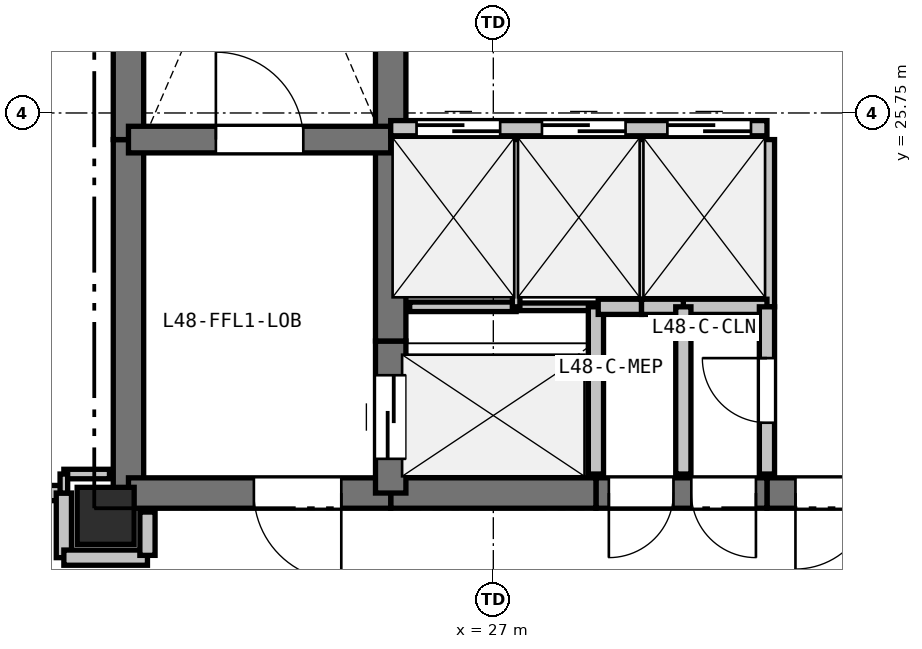
"""IFC4 building model, lengths in metres.
Left out: names, types, materials, properties, quantities, classifications, styles, units other than length and angle.
Written with IfcOpenShell. Run it as: python <this file> out.ifc"""

import sys

from ifc_helpers import new_model, si_unit, direction, frame, frame_2d, origin, origin_2d, place, context, subcontext, project, spatial, rectangle, extrude, element, fill, save


model = new_model("IFC4")
c1 = context("Model", 3, precision=1e-05, world=origin(), true_north=direction((0.0, 1.0)))
c2 = subcontext(c1, "Body", "Model", "MODEL_VIEW")
j1 = project(units=[si_unit("LENGTHUNIT", "METRE"), si_unit("PLANEANGLEUNIT", "RADIAN")], contexts=[c1])
p1 = place(None, origin())
s1 = spatial("IfcSite", under=j1, at=p1, CompositionType="ELEMENT")
p2 = place(p1, origin())
s2 = spatial("IfcBuilding", under=s1, at=p2, CompositionType="ELEMENT")
p3 = place(p2, frame((0.0, 0.0, 175.5)))
s3 = spatial("IfcBuildingStorey", under=s2, at=p3, CompositionType="ELEMENT", Elevation=175.5)
p4 = place(p3, frame((21.9, 20.45, 0.0), z_axis=(0.0, 0.0, 1.0), x_axis=(1.0, 0.0, 0.0)))
e1 = element("IfcColumn", 1, at=p4, inside=s3, PredefinedType="COLUMN", context=c2, shape_type="SweptSolid", body=[
    extrude(rectangle(XDim=0.75, YDim=0.75, at=origin_2d()), origin(), (0.0, 0.0, 1.0), 3.3),
])
p5 = place(p3, frame((22.2, 20.75, 0.0), z_axis=(0.0, 0.0, 1.0), x_axis=(0.0, 1.0, 0.0)))
e2 = element("IfcWall", 2, at=p5, inside=s3, PredefinedType="SHEAR", context=c2, shape_type="SweptSolid", body=[
    extrude(rectangle(XDim=4.65, YDim=0.4, at=frame_2d((2.325, 0.0))), origin(), (0.0, 0.0, 1.0), 3.07),
])
p6 = place(p3, frame((22.2, 25.4, 0.0), z_axis=(0.0, 0.0, 1.0), x_axis=(0.0, 1.0, 0.0)))
e3 = element("IfcWall", 3, at=p6, inside=s3, PredefinedType="SHEAR", context=c2, shape_type="SweptSolid", body=[
    extrude(rectangle(XDim=7.35, YDim=0.4, at=frame_2d((3.675, 0.0))), origin(), (0.0, 0.0, 1.0), 3.07),
])
p7 = place(p3, frame((32.35, 20.75, 0.0), z_axis=(0.0, 0.0, 1.0), x_axis=(-1.0, 0.0, 0.0)))
e4 = element("IfcWall", 4, at=p7, inside=s3, PredefinedType="SHEAR", context=c2, shape_type="SweptSolid", body=[
    extrude(rectangle(XDim=1.75, YDim=0.4, at=frame_2d((0.875, 0.0))), origin(), (0.0, 0.0, 1.0), 3.07),
])
p8 = place(p7, frame((0.375, 0.0, 0.0)))
e5 = element("IfcOpeningElement", 5, at=p8, cuts=e4, PredefinedType="OPENING", context=c2, shape_type="SweptSolid", body=[
    extrude(rectangle(XDim=1.0, YDim=2.15, at=frame_2d((0.5, 1.075))), frame((0.0, 0.21, 0.0), z_axis=(0.0, -1.0, 0.0), x_axis=(1.0, 0.0, 0.0)), (0.0, 0.0, 1.0), 0.42),
])
p9 = place(p3, frame((30.6, 20.75, 0.0), z_axis=(0.0, 0.0, 1.0), x_axis=(-1.0, 0.0, 0.0)))
e6 = element("IfcWall", 6, at=p9, inside=s3, PredefinedType="SHEAR", context=c2, shape_type="SweptSolid", body=[
    extrude(rectangle(XDim=2.25, YDim=0.4, at=frame_2d((1.125, 0.0))), origin(), (0.0, 0.0, 1.0), 3.07),
])
p10 = place(p9, frame((1.23, 0.0, 0.0)))
e7 = element("IfcOpeningElement", 7, at=p10, cuts=e6, PredefinedType="OPENING", context=c2, shape_type="SweptSolid", body=[
    extrude(rectangle(XDim=0.85, YDim=2.1, at=frame_2d((0.425, 1.05))), frame((0.0, 0.21, 0.0), z_axis=(0.0, -1.0, 0.0), x_axis=(1.0, 0.0, 0.0)), (0.0, 0.0, 1.0), 0.42),
])
p11 = place(p9, frame((0.145, 0.0, 0.0)))
e8 = element("IfcOpeningElement", 8, at=p11, cuts=e6, PredefinedType="OPENING", context=c2, shape_type="SweptSolid", body=[
    extrude(rectangle(XDim=0.85, YDim=2.1, at=frame_2d((0.425, 1.05))), frame((0.0, 0.21, 0.0), z_axis=(0.0, -1.0, 0.0), x_axis=(1.0, 0.0, 0.0)), (0.0, 0.0, 1.0), 0.42),
])
p12 = place(p3, frame((28.35, 20.75, 0.0), z_axis=(0.0, 0.0, 1.0), x_axis=(-1.0, 0.0, 0.0)))
e9 = element("IfcWall", 9, at=p12, inside=s3, PredefinedType="SHEAR", context=c2, shape_type="SweptSolid", body=[
    extrude(rectangle(XDim=2.7, YDim=0.4, at=frame_2d((1.35, 0.0))), origin(), (0.0, 0.0, 1.0), 3.07),
])
p13 = place(p3, frame((25.65, 20.75, 0.0), z_axis=(0.0, 0.0, 1.0), x_axis=(-1.0, 0.0, 0.0)))
e10 = element("IfcWall", 10, at=p13, inside=s3, PredefinedType="SHEAR", context=c2, shape_type="SweptSolid", body=[
    extrude(rectangle(XDim=3.45, YDim=0.4, at=frame_2d((1.725, 0.0))), origin(), (0.0, 0.0, 1.0), 3.07),
])
p14 = place(p13, frame((0.65, 0.0, 0.0)))
e11 = element("IfcOpeningElement", 11, at=p14, cuts=e10, PredefinedType="OPENING", context=c2, shape_type="SweptSolid", body=[
    extrude(rectangle(XDim=1.15, YDim=2.15, at=frame_2d((0.575, 1.075))), frame((0.0, 0.21, 0.0), z_axis=(0.0, -1.0, 0.0), x_axis=(1.0, 0.0, 0.0)), (0.0, 0.0, 1.0), 0.42),
])
p15 = place(p3, frame((25.65, 20.75, 0.0), z_axis=(0.0, 0.0, 1.0), x_axis=(0.0, 1.0, 0.0)))
e12 = element("IfcWall", 12, at=p15, inside=s3, PredefinedType="SHEAR", context=c2, shape_type="SweptSolid", body=[
    extrude(rectangle(XDim=2.0, YDim=0.4, at=frame_2d((1.0, 0.0))), origin(), (0.0, 0.0, 1.0), 3.07),
])
p16 = place(p15, frame((0.45, 0.0, 0.0)))
e13 = element("IfcOpeningElement", 13, at=p16, cuts=e12, PredefinedType="OPENING", context=c2, shape_type="SweptSolid", body=[
    extrude(rectangle(XDim=1.1, YDim=2.15, at=frame_2d((0.55, 1.075))), frame((0.0, 0.21, 0.0), z_axis=(0.0, -1.0, 0.0), x_axis=(1.0, 0.0, 0.0)), (0.0, 0.0, 1.0), 0.42),
])
p17 = place(p3, frame((25.65, 22.75, 0.0), z_axis=(0.0, 0.0, 1.0), x_axis=(0.0, 1.0, 0.0)))
e14 = element("IfcWall", 14, at=p17, inside=s3, PredefinedType="SHEAR", context=c2, shape_type="SweptSolid", body=[
    extrude(rectangle(XDim=2.8, YDim=0.4, at=frame_2d((1.4, 0.0))), origin(), (0.0, 0.0, 1.0), 3.07),
])
p18 = place(p3, frame((25.65, 25.55, 0.0), z_axis=(0.0, 0.0, 1.0), x_axis=(0.0, 1.0, 0.0)))
e15 = element("IfcWall", 15, at=p18, inside=s3, PredefinedType="SHEAR", context=c2, shape_type="SweptSolid", body=[
    extrude(rectangle(XDim=2.4, YDim=0.4, at=frame_2d((1.2, 0.0))), origin(), (0.0, 0.0, 1.0), 3.07),
])
p19 = place(p3, frame((22.2, 25.4, 0.0), z_axis=(0.0, 0.0, 1.0), x_axis=(1.0, 0.0, 0.0)))
e16 = element("IfcWall", 16, at=p19, inside=s3, PredefinedType="SHEAR", context=c2, shape_type="SweptSolid", body=[
    extrude(rectangle(XDim=3.45, YDim=0.35, at=frame_2d((1.725, 0.0))), origin(), (0.0, 0.0, 1.0), 3.07),
])
p20 = place(p19, frame((1.15, 0.0, 0.0)))
e17 = element("IfcOpeningElement", 17, at=p20, cuts=e16, PredefinedType="OPENING", context=c2, shape_type="SweptSolid", body=[
    extrude(rectangle(XDim=1.15, YDim=2.15, at=frame_2d((0.575, 1.075))), frame((0.0, 0.185, 0.0), z_axis=(0.0, -1.0, 0.0), x_axis=(1.0, 0.0, 0.0)), (0.0, 0.0, 1.0), 0.37),
])
p21 = place(p3, frame((25.65, 25.55, 0.0), z_axis=(0.0, 0.0, 1.0), x_axis=(1.0, 0.0, 0.0)))
e18 = element("IfcWall", 18, at=p21, inside=s3, PredefinedType="PARTITIONING", context=c2, shape_type="SweptSolid", body=[
    extrude(rectangle(XDim=4.95, YDim=0.2, at=frame_2d((2.475, 0.0))), origin(), (0.0, 0.0, 1.0), 3.07),
])
p22 = place(p21, frame((0.34, 0.0, 0.0)))
e19 = element("IfcOpeningElement", 19, at=p22, cuts=e18, PredefinedType="OPENING", context=c2, shape_type="SweptSolid", body=[
    extrude(rectangle(XDim=1.1, YDim=2.15, at=frame_2d((0.55, 1.075))), frame((0.0, 0.11, 0.0), z_axis=(0.0, -1.0, 0.0), x_axis=(1.0, 0.0, 0.0)), (0.0, 0.0, 1.0), 0.22),
])
p23 = place(p21, frame((1.99, 0.0, 0.0)))
e20 = element("IfcOpeningElement", 20, at=p23, cuts=e18, PredefinedType="OPENING", context=c2, shape_type="SweptSolid", body=[
    extrude(rectangle(XDim=1.1, YDim=2.15, at=frame_2d((0.55, 1.075))), frame((0.0, 0.11, 0.0), z_axis=(0.0, -1.0, 0.0), x_axis=(1.0, 0.0, 0.0)), (0.0, 0.0, 1.0), 0.22),
])
p24 = place(p21, frame((3.64, 0.0, 0.0)))
e21 = element("IfcOpeningElement", 21, at=p24, cuts=e18, PredefinedType="OPENING", context=c2, shape_type="SweptSolid", body=[
    extrude(rectangle(XDim=1.1, YDim=2.15, at=frame_2d((0.55, 1.075))), frame((0.0, 0.11, 0.0), z_axis=(0.0, -1.0, 0.0), x_axis=(1.0, 0.0, 0.0)), (0.0, 0.0, 1.0), 0.22),
])
p25 = place(p3, frame((25.9, 23.2, 0.0), z_axis=(0.0, 0.0, 1.0), x_axis=(1.0, 0.0, 0.0)))
e22 = element("IfcWall", 22, at=p25, inside=s3, PredefinedType="PARTITIONING", context=c2, shape_type="SweptSolid", body=[
    extrude(rectangle(XDim=1.4, YDim=0.125, at=frame_2d((0.7, 0.0))), origin(), (0.0, 0.0, 1.0), 3.07),
])
p26 = place(p3, frame((27.3, 23.2, 0.0), z_axis=(0.0, 0.0, 1.0), x_axis=(1.0, 0.0, 0.0)))
e23 = element("IfcWall", 23, at=p26, inside=s3, PredefinedType="PARTITIONING", context=c2, shape_type="SweptSolid", body=[
    extrude(rectangle(XDim=1.05, YDim=0.1, at=frame_2d((0.525, 0.0))), origin(), (0.0, 0.0, 1.0), 3.07),
])
p27 = place(p3, frame((28.35, 23.2, 0.0), z_axis=(0.0, 0.0, 1.0), x_axis=(0.0, -1.0, 0.0)))
e24 = element("IfcWall", 24, at=p27, inside=s3, PredefinedType="PARTITIONING", context=c2, shape_type="SweptSolid", body=[
    extrude(rectangle(XDim=2.2, YDim=0.2, at=frame_2d((1.1, 0.0))), origin(), (0.0, 0.0, 1.0), 3.07),
])
p28 = place(p3, frame((27.3, 25.4, 0.0), z_axis=(0.0, 0.0, 1.0), x_axis=(0.0, -1.0, 0.0)))
e25 = element("IfcWall", 25, at=p28, inside=s3, PredefinedType="PARTITIONING", context=c2, shape_type="SweptSolid", body=[
    extrude(rectangle(XDim=2.2, YDim=0.1, at=frame_2d((1.1, 0.0))), origin(), (0.0, 0.0, 1.0), 3.07),
])
p29 = place(p3, frame((28.95, 25.4, 0.0), z_axis=(0.0, 0.0, 1.0), x_axis=(0.0, -1.0, 0.0)))
e26 = element("IfcWall", 26, at=p29, inside=s3, PredefinedType="PARTITIONING", context=c2, shape_type="SweptSolid", body=[
    extrude(rectangle(XDim=2.2, YDim=0.125, at=frame_2d((1.1, 0.0))), origin(), (0.0, 0.0, 1.0), 3.07),
])
p30 = place(p3, frame((28.95, 23.2, 0.0), z_axis=(0.0, 0.0, 1.0), x_axis=(-1.0, 0.0, 0.0)))
e27 = element("IfcWall", 27, at=p30, inside=s3, PredefinedType="PARTITIONING", context=c2, shape_type="SweptSolid", body=[
    extrude(rectangle(XDim=0.57, YDim=0.2, at=frame_2d((0.285, 0.0))), origin(), (0.0, 0.0, 1.0), 3.07),
])
p31 = place(p3, frame((30.6, 25.4, 0.0), z_axis=(0.0, 0.0, 1.0), x_axis=(0.0, -1.0, 0.0)))
e28 = element("IfcWall", 28, at=p31, inside=s3, PredefinedType="PARTITIONING", context=c2, shape_type="SweptSolid", body=[
    extrude(rectangle(XDim=2.2, YDim=0.2, at=frame_2d((1.1, 0.0))), origin(), (0.0, 0.0, 1.0), 3.07),
])
p32 = place(p3, frame((30.6, 23.2, 0.0), z_axis=(0.0, 0.0, 1.0), x_axis=(-1.0, 0.0, 0.0)))
e29 = element("IfcWall", 29, at=p32, inside=s3, PredefinedType="PARTITIONING", context=c2, shape_type="SweptSolid", body=[
    extrude(rectangle(XDim=1.1, YDim=0.2, at=frame_2d((0.55, 0.0))), origin(), (0.0, 0.0, 1.0), 3.07),
])
p33 = place(p3, frame((29.5, 23.2, 0.0), z_axis=(0.0, 0.0, 1.0), x_axis=(-1.0, 0.0, 0.0)))
e30 = element("IfcWall", 30, at=p33, inside=s3, PredefinedType="PARTITIONING", context=c2, shape_type="SweptSolid", body=[
    extrude(rectangle(XDim=0.55, YDim=0.2, at=frame_2d((0.275, 0.0))), origin(), (0.0, 0.0, 1.0), 3.07),
])
p34 = place(p3, frame((30.6, 21.0, 0.0), z_axis=(0.0, 0.0, 1.0), x_axis=(0.0, 1.0, 0.0)))
e31 = element("IfcWall", 31, at=p34, inside=s3, PredefinedType="PARTITIONING", context=c2, shape_type="SweptSolid", body=[
    extrude(rectangle(XDim=2.2, YDim=0.2, at=frame_2d((1.1, 0.0))), origin(), (0.0, 0.0, 1.0), 3.07),
])
p35 = place(p34, frame((0.675, 0.0, 0.0)))
e32 = element("IfcOpeningElement", 32, at=p35, cuts=e31, PredefinedType="OPENING", context=c2, shape_type="SweptSolid", body=[
    extrude(rectangle(XDim=0.85, YDim=2.1, at=frame_2d((0.425, 1.05))), frame((0.0, 0.11, 0.0), z_axis=(0.0, -1.0, 0.0), x_axis=(1.0, 0.0, 0.0)), (0.0, 0.0, 1.0), 0.22),
])
p36 = place(p3, frame((20.0, 20.75, 0.0), z_axis=(0.0, 0.0, 1.0), x_axis=(1.0, 0.0, 0.0)))
e33 = element("IfcWall", 33, at=p36, inside=s3, PredefinedType="PARTITIONING", context=c2, shape_type="SweptSolid", body=[
    extrude(rectangle(XDim=1.35, YDim=0.2, at=frame_2d((0.675, 0.0))), origin(), (0.0, 0.0, 1.0), 2.518),
])
p37 = place(p36, frame((0.175, 0.0, 0.0)))
e34 = element("IfcOpeningElement", 34, at=p37, cuts=e33, PredefinedType="OPENING", context=c2, shape_type="SweptSolid", body=[
    extrude(rectangle(XDim=1.0, YDim=2.15, at=frame_2d((0.5, 1.075))), frame((0.0, 0.11, 0.0), z_axis=(0.0, -1.0, 0.0), x_axis=(1.0, 0.0, 0.0)), (0.0, 0.0, 1.0), 0.22),
])
p38 = place(p3, frame((21.35, 20.75, 0.0), z_axis=(0.0, 0.0, 1.0), x_axis=(0.0, -1.0, 0.0)))
e35 = element("IfcWall", 35, at=p38, inside=s3, PredefinedType="PARTITIONING", context=c2, shape_type="SweptSolid", body=[
    extrude(rectangle(XDim=0.85, YDim=0.2, at=frame_2d((0.425, 0.0))), origin(), (0.0, 0.0, 1.0), 2.518),
])
p39 = place(p3, frame((21.35, 19.9, 0.0), z_axis=(0.0, 0.0, 1.0), x_axis=(1.0, 0.0, 0.0)))
e36 = element("IfcWall", 36, at=p39, inside=s3, PredefinedType="PARTITIONING", context=c2, shape_type="SweptSolid", body=[
    extrude(rectangle(XDim=1.1, YDim=0.2, at=frame_2d((0.55, 0.0))), origin(), (0.0, 0.0, 1.0), 2.518),
])
p40 = place(p3, frame((22.45, 19.93, 0.0), z_axis=(0.0, 0.0, 1.0), x_axis=(0.0, 1.0, 0.0)))
e37 = element("IfcWall", 37, at=p40, inside=s3, PredefinedType="PARTITIONING", context=c2, shape_type="SweptSolid", body=[
    extrude(rectangle(XDim=0.57, YDim=0.2, at=frame_2d((0.285, 0.0))), origin(), (0.0, 0.0, 1.0), 2.518),
])
p41 = place(p3, frame((29.5, 23.2, 0.0), z_axis=(0.0, 0.0, 1.0), x_axis=(0.0, -1.0, 0.0)))
e38 = element("IfcWall", 38, at=p41, inside=s3, PredefinedType="PARTITIONING", context=c2, shape_type="SweptSolid", body=[
    extrude(rectangle(XDim=2.2, YDim=0.2, at=frame_2d((1.1, 0.0))), origin(), (0.0, 0.0, 1.0), 3.07),
])
p42 = place(p3, frame((21.95, 21.0, 0.0), z_axis=(0.0, 0.0, 1.0), x_axis=(-1.0, 0.0, 0.0)))
e39 = element("IfcWall", 39, at=p42, inside=s3, PredefinedType="PARTITIONING", context=c2, shape_type="SweptSolid", body=[
    extrude(rectangle(XDim=0.6, YDim=0.125, at=frame_2d((0.3, 0.0))), origin(), (0.0, 0.0, 1.0), 2.595),
])
p43 = place(p3, frame((21.35, 21.0, 0.0), z_axis=(0.0, 0.0, 1.0), x_axis=(0.0, -1.0, 0.0)))
e40 = element("IfcWall", 40, at=p43, inside=s3, PredefinedType="PARTITIONING", context=c2, shape_type="SweptSolid", body=[
    extrude(rectangle(XDim=0.25, YDim=0.1, at=frame_2d((0.125, 0.0))), origin(), (0.0, 0.0, 1.0), 2.518),
])
p44 = place(p22, origin())
e41 = element("IfcDoor", 41, at=p44, inside=s3, OperationType="SLIDING_TO_LEFT", PredefinedType="DOOR", context=c2, shape_type="SweptSolid", body=[
    extrude(rectangle(XDim=1.1, YDim=2.15, at=frame_2d((0.55, 1.075))), frame((0.0, 0.025, 0.0), z_axis=(0.0, -1.0, 0.0), x_axis=(1.0, 0.0, 0.0)), (0.0, 0.0, 1.0), 0.05),
])
fill(e19, e41)
p45 = place(p23, origin())
e42 = element("IfcDoor", 42, at=p45, inside=s3, OperationType="SLIDING_TO_LEFT", PredefinedType="DOOR", context=c2, shape_type="SweptSolid", body=[
    extrude(rectangle(XDim=1.1, YDim=2.15, at=frame_2d((0.55, 1.075))), frame((0.0, 0.025, 0.0), z_axis=(0.0, -1.0, 0.0), x_axis=(1.0, 0.0, 0.0)), (0.0, 0.0, 1.0), 0.05),
])
fill(e20, e42)
p46 = place(p24, origin())
e43 = element("IfcDoor", 43, at=p46, inside=s3, OperationType="SLIDING_TO_LEFT", PredefinedType="DOOR", context=c2, shape_type="SweptSolid", body=[
    extrude(rectangle(XDim=1.1, YDim=2.15, at=frame_2d((0.55, 1.075))), frame((0.0, 0.025, 0.0), z_axis=(0.0, -1.0, 0.0), x_axis=(1.0, 0.0, 0.0)), (0.0, 0.0, 1.0), 0.05),
])
fill(e21, e43)
p47 = place(p8, origin())
e44 = element("IfcDoor", 44, at=p47, inside=s3, OperationType="SINGLE_SWING_RIGHT", PredefinedType="DOOR", context=c2, shape_type="SweptSolid", body=[
    extrude(rectangle(XDim=1.0, YDim=2.15, at=frame_2d((0.5, 1.075))), frame((0.0, 0.025, 0.0), z_axis=(0.0, -1.0, 0.0), x_axis=(1.0, 0.0, 0.0)), (0.0, 0.0, 1.0), 0.05),
])
fill(e5, e44)
p48 = place(p16, origin())
e45 = element("IfcDoor", 45, at=p48, inside=s3, OperationType="SLIDING_TO_LEFT", PredefinedType="DOOR", context=c2, shape_type="SweptSolid", body=[
    extrude(rectangle(XDim=1.1, YDim=2.15, at=frame_2d((0.55, 1.075))), frame((0.0, 0.025, 0.0), z_axis=(0.0, -1.0, 0.0), x_axis=(1.0, 0.0, 0.0)), (0.0, 0.0, 1.0), 0.05),
])
fill(e13, e45)
p49 = place(p20, origin())
e46 = element("IfcDoor", 46, at=p49, inside=s3, OperationType="SINGLE_SWING_LEFT", PredefinedType="DOOR", context=c2, shape_type="SweptSolid", body=[
    extrude(rectangle(XDim=1.15, YDim=2.15, at=frame_2d((0.575, 1.075))), frame((0.0, 0.025, 0.0), z_axis=(0.0, -1.0, 0.0), x_axis=(1.0, 0.0, 0.0)), (0.0, 0.0, 1.0), 0.05),
])
fill(e17, e46)
p50 = place(p14, origin())
e47 = element("IfcDoor", 47, at=p50, inside=s3, OperationType="SINGLE_SWING_LEFT", PredefinedType="DOOR", context=c2, shape_type="SweptSolid", body=[
    extrude(rectangle(XDim=1.15, YDim=2.15, at=frame_2d((0.575, 1.075))), frame((0.0, 0.025, 0.0), z_axis=(0.0, -1.0, 0.0), x_axis=(1.0, 0.0, 0.0)), (0.0, 0.0, 1.0), 0.05),
])
fill(e11, e47)
p51 = place(p35, origin())
e48 = element("IfcDoor", 48, at=p51, inside=s3, OperationType="SINGLE_SWING_RIGHT", PredefinedType="DOOR", context=c2, shape_type="SweptSolid", body=[
    extrude(rectangle(XDim=0.85, YDim=2.1, at=frame_2d((0.425, 1.05))), frame((0.0, 0.025, 0.0), z_axis=(0.0, -1.0, 0.0), x_axis=(1.0, 0.0, 0.0)), (0.0, 0.0, 1.0), 0.05),
])
fill(e32, e48)
p52 = place(p10, origin())
e49 = element("IfcDoor", 49, at=p52, inside=s3, OperationType="SINGLE_SWING_RIGHT", PredefinedType="DOOR", context=c2, shape_type="SweptSolid", body=[
    extrude(rectangle(XDim=0.85, YDim=2.1, at=frame_2d((0.425, 1.05))), frame((0.0, 0.025, 0.0), z_axis=(0.0, -1.0, 0.0), x_axis=(1.0, 0.0, 0.0)), (0.0, 0.0, 1.0), 0.05),
])
fill(e7, e49)
p53 = place(p11, origin())
e50 = element("IfcDoor", 50, at=p53, inside=s3, OperationType="SINGLE_SWING_LEFT", PredefinedType="DOOR", context=c2, shape_type="SweptSolid", body=[
    extrude(rectangle(XDim=0.85, YDim=2.1, at=frame_2d((0.425, 1.05))), frame((0.0, 0.025, 0.0), z_axis=(0.0, -1.0, 0.0), x_axis=(1.0, 0.0, 0.0)), (0.0, 0.0, 1.0), 0.05),
])
fill(e8, e50)
save(model, sys.argv[1])
